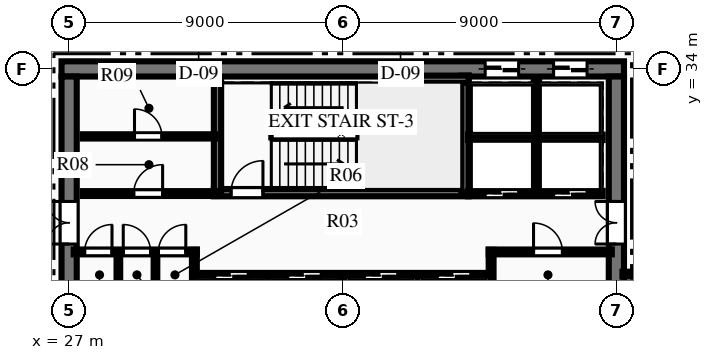
"""IFC4 building model, lengths in metres.
Left out: names, types, materials, properties, quantities, classifications, styles, units other than length and angle.
Written with IfcOpenShell. Run it as: python <this file> out.ifc"""

import sys

from ifc_helpers import new_model, si_unit, direction, frame, frame_2d, origin, place, context, subcontext, project, spatial, rectangle, extrude, element, fill, save


model = new_model("IFC4")
c1 = context("Model", 3, precision=1e-05, world=origin(), true_north=direction((0.0, 1.0)))
c2 = subcontext(c1, "Body", "Model", "MODEL_VIEW")
j1 = project(units=[si_unit("LENGTHUNIT", "METRE"), si_unit("PLANEANGLEUNIT", "RADIAN")], contexts=[c1])
p1 = place(None, origin())
s1 = spatial("IfcSite", under=j1, at=p1, CompositionType="ELEMENT")
p2 = place(p1, origin())
s2 = spatial("IfcBuilding", under=s1, at=p2, CompositionType="ELEMENT")
p3 = place(p2, frame((0.0, 0.0, 140.7)))
s3 = spatial("IfcBuildingStorey", under=s2, at=p3, CompositionType="ELEMENT", Elevation=140.7)
p4 = place(p3, frame((26.75, 34.0, 0.0), z_axis=(0.0, 0.0, 1.0), x_axis=(1.0, 0.0, 0.0)))
e1 = element("IfcWall", 1, at=p4, inside=s3, PredefinedType="SHEAR", context=c2, shape_type="SweptSolid", body=[
    extrude(rectangle(XDim=18.5, YDim=0.5, at=frame_2d((9.25, 0.0))), origin(), (0.0, 0.0, 1.0), 3.75),
])
p5 = place(p4, frame((13.935, 0.0, 0.0)))
e2 = element("IfcOpeningElement", 2, at=p5, cuts=e1, PredefinedType="OPENING", context=c2, shape_type="SweptSolid", body=[
    extrude(rectangle(XDim=1.1, YDim=2.15, at=frame_2d((0.55, 1.075))), frame((0.0, 0.26, 0.0), z_axis=(0.0, -1.0, 0.0), x_axis=(1.0, 0.0, 0.0)), (0.0, 0.0, 1.0), 0.52),
])
p6 = place(p4, frame((16.185, 0.0, 0.0)))
e3 = element("IfcOpeningElement", 3, at=p6, cuts=e1, PredefinedType="OPENING", context=c2, shape_type="SweptSolid", body=[
    extrude(rectangle(XDim=1.1, YDim=2.15, at=frame_2d((0.55, 1.075))), frame((0.0, 0.26, 0.0), z_axis=(0.0, -1.0, 0.0), x_axis=(1.0, 0.0, 0.0)), (0.0, 0.0, 1.0), 0.52),
])
p7 = place(p3, frame((27.0, 18.25, 0.0), z_axis=(0.0, 0.0, 1.0), x_axis=(0.0, 1.0, 0.0)))
e4 = element("IfcWall", 4, at=p7, inside=s3, PredefinedType="SHEAR", context=c2, shape_type="SweptSolid", body=[
    extrude(rectangle(XDim=15.5, YDim=0.5, at=frame_2d((7.75, 0.0))), origin(), (0.0, 0.0, 1.0), 3.75),
])
p8 = place(p7, frame((9.99, 0.0, 0.0)))
e5 = element("IfcOpeningElement", 5, at=p8, cuts=e4, PredefinedType="OPENING", context=c2, shape_type="SweptSolid", body=[
    extrude(rectangle(XDim=1.4, YDim=2.2, at=frame_2d((0.7, 1.1))), frame((0.0, 0.26, 0.0), z_axis=(0.0, -1.0, 0.0), x_axis=(1.0, 0.0, 0.0)), (0.0, 0.0, 1.0), 0.52),
])
p9 = place(p3, frame((45.0, 18.25, 0.0), z_axis=(0.0, 0.0, 1.0), x_axis=(0.0, 1.0, 0.0)))
e6 = element("IfcWall", 6, at=p9, inside=s3, PredefinedType="SHEAR", context=c2, shape_type="SweptSolid", body=[
    extrude(rectangle(XDim=15.5, YDim=0.5, at=frame_2d((7.75, 0.0))), origin(), (0.0, 0.0, 1.0), 3.75),
])
p10 = place(p9, frame((9.99, 0.0, 0.0)))
e7 = element("IfcOpeningElement", 7, at=p10, cuts=e6, PredefinedType="OPENING", context=c2, shape_type="SweptSolid", body=[
    extrude(rectangle(XDim=1.4, YDim=2.2, at=frame_2d((0.7, 1.1))), frame((0.0, 0.26, 0.0), z_axis=(0.0, -1.0, 0.0), x_axis=(1.0, 0.0, 0.0)), (0.0, 0.0, 1.0), 0.52),
])
p11 = place(p3, frame((31.76, 29.93, 0.0), z_axis=(0.0, 0.0, 1.0), x_axis=(1.0, 0.0, 0.0)))
e8 = element("IfcWall", 8, at=p11, inside=s3, PredefinedType="SHEAR", context=c2, shape_type="SweptSolid", body=[
    extrude(rectangle(XDim=8.38, YDim=0.24, at=frame_2d((4.19, 0.0))), origin(), (0.0, 0.0, 1.0), 3.75),
])
p12 = place(p11, frame((0.565, 0.0, 0.0)))
e9 = element("IfcOpeningElement", 9, at=p12, cuts=e8, PredefinedType="OPENING", context=c2, shape_type="SweptSolid", body=[
    extrude(rectangle(XDim=1.05, YDim=2.15, at=frame_2d((0.525, 1.075))), frame((0.0, 0.13, 0.0), z_axis=(0.0, -1.0, 0.0), x_axis=(1.0, 0.0, 0.0)), (0.0, 0.0, 1.0), 0.26),
])
p13 = place(p3, frame((31.88, 29.93, 0.0), z_axis=(0.0, 0.0, 1.0), x_axis=(0.0, 1.0, 0.0)))
e10 = element("IfcWall", 10, at=p13, inside=s3, PredefinedType="SHEAR", context=c2, shape_type="SweptSolid", body=[
    extrude(rectangle(XDim=3.79, YDim=0.24, at=frame_2d((1.895, 0.0))), origin(), (0.0, 0.0, 1.0), 3.75),
])
p14 = place(p3, frame((40.02, 29.93, 0.0), z_axis=(0.0, 0.0, 1.0), x_axis=(0.0, 1.0, 0.0)))
e11 = element("IfcWall", 11, at=p14, inside=s3, PredefinedType="SHEAR", context=c2, shape_type="SweptSolid", body=[
    extrude(rectangle(XDim=3.85, YDim=0.24, at=frame_2d((1.925, 0.0))), origin(), (0.0, 0.0, 1.0), 3.75),
])
p15 = place(p3, frame((37.85, 33.66, 0.0), z_axis=(0.0, 0.0, 1.0), x_axis=(1.0, 0.0, 0.0)))
e12 = element("IfcWall", 12, at=p15, inside=s3, PredefinedType="SHEAR", context=c2, shape_type="SweptSolid", body=[
    extrude(rectangle(XDim=2.29, YDim=0.24, at=frame_2d((1.145, 0.0))), origin(), (0.0, 0.0, 1.0), 3.75),
])
p16 = place(p3, frame((27.15, 27.98, 0.0), z_axis=(0.0, 0.0, 1.0), x_axis=(1.0, 0.0, 0.0)))
e13 = element("IfcWall", 13, at=p16, inside=s3, PredefinedType="PARTITIONING", context=c2, shape_type="SweptSolid", body=[
    extrude(rectangle(XDim=4.05, YDim=0.16, at=frame_2d((2.025, 0.0))), origin(), (0.0, 0.0, 1.0), 3.46),
])
p17 = place(p16, frame((0.36, 0.0, 0.0)))
e14 = element("IfcOpeningElement", 14, at=p17, cuts=e13, PredefinedType="OPENING", context=c2, shape_type="SweptSolid", body=[
    extrude(rectangle(XDim=0.9, YDim=2.15, at=frame_2d((0.45, 1.075))), frame((0.0, 0.09, 0.0), z_axis=(0.0, -1.0, 0.0), x_axis=(1.0, 0.0, 0.0)), (0.0, 0.0, 1.0), 0.18),
])
p18 = place(p16, frame((1.63, 0.0, 0.0)))
e15 = element("IfcOpeningElement", 15, at=p18, cuts=e13, PredefinedType="OPENING", context=c2, shape_type="SweptSolid", body=[
    extrude(rectangle(XDim=0.9, YDim=2.15, at=frame_2d((0.45, 1.075))), frame((0.0, 0.09, 0.0), z_axis=(0.0, -1.0, 0.0), x_axis=(1.0, 0.0, 0.0)), (0.0, 0.0, 1.0), 0.18),
])
p19 = place(p16, frame((2.788, 0.0, 0.0)))
e16 = element("IfcOpeningElement", 16, at=p19, cuts=e13, PredefinedType="OPENING", context=c2, shape_type="SweptSolid", body=[
    extrude(rectangle(XDim=0.9, YDim=2.15, at=frame_2d((0.45, 1.075))), frame((0.0, 0.09, 0.0), z_axis=(0.0, -1.0, 0.0), x_axis=(1.0, 0.0, 0.0)), (0.0, 0.0, 1.0), 0.18),
])
p20 = place(p3, frame((31.12, 26.54, 0.0), z_axis=(0.0, 0.0, 1.0), x_axis=(0.0, 1.0, 0.0)))
e17 = element("IfcWall", 17, at=p20, inside=s3, PredefinedType="PARTITIONING", context=c2, shape_type="SweptSolid", body=[
    extrude(rectangle(XDim=1.51, YDim=0.16, at=frame_2d((0.755, 0.0))), origin(), (0.0, 0.0, 1.0), 3.46),
])
p21 = place(p3, frame((40.8, 27.98, 0.0), z_axis=(0.0, 0.0, 1.0), x_axis=(1.0, 0.0, 0.0)))
e18 = element("IfcWall", 18, at=p21, inside=s3, PredefinedType="PARTITIONING", context=c2, shape_type="SweptSolid", body=[
    extrude(rectangle(XDim=4.05, YDim=0.16, at=frame_2d((2.025, 0.0))), origin(), (0.0, 0.0, 1.0), 3.46),
])
p22 = place(p21, frame((1.475, 0.0, 0.0)))
e19 = element("IfcOpeningElement", 19, at=p22, cuts=e18, PredefinedType="OPENING", context=c2, shape_type="SweptSolid", body=[
    extrude(rectangle(XDim=0.95, YDim=2.15, at=frame_2d((0.475, 1.075))), frame((0.0, 0.09, 0.0), z_axis=(0.0, -1.0, 0.0), x_axis=(1.0, 0.0, 0.0)), (0.0, 0.0, 1.0), 0.18),
])
p23 = place(p3, frame((40.88, 26.54, 0.0), z_axis=(0.0, 0.0, 1.0), x_axis=(0.0, 1.0, 0.0)))
e20 = element("IfcWall", 20, at=p23, inside=s3, PredefinedType="PARTITIONING", context=c2, shape_type="SweptSolid", body=[
    extrude(rectangle(XDim=1.51, YDim=0.16, at=frame_2d((0.755, 0.0))), origin(), (0.0, 0.0, 1.0), 3.46),
])
for number, where, z_axis, x_axis in (
    (21, (28.62, 26.54, 0.0), (0.0, 0.0, 1.0), (0.0, 1.0, 0.0)),
    (22, (29.84, 26.54, 0.0), (0.0, 0.0, 1.0), (0.0, 1.0, 0.0)),
):
    element("IfcWall", number, at=place(p3, frame(where, z_axis=z_axis, x_axis=x_axis)), inside=s3, PredefinedType="PARTITIONING", context=c2, shape_type="SweptSolid", body=[
        extrude(rectangle(XDim=1.44, YDim=0.12, at=frame_2d((0.72, 0.0))), origin(), (0.0, 0.0, 1.0), 3.46),
    ])
p24 = place(p3, frame((27.45, 29.9, 0.0), z_axis=(0.0, 0.0, 1.0), x_axis=(1.0, 0.0, 0.0)))
e23 = element("IfcWall", 23, at=p24, inside=s3, PredefinedType="PARTITIONING", context=c2, shape_type="SweptSolid", body=[
    extrude(rectangle(XDim=4.43, YDim=0.16, at=frame_2d((2.215, 0.0))), origin(), (0.0, 0.0, 1.0), 3.46),
])
p25 = place(p24, frame((1.675, 0.0, 0.0)))
e24 = element("IfcOpeningElement", 24, at=p25, cuts=e23, PredefinedType="OPENING", context=c2, shape_type="SweptSolid", body=[
    extrude(rectangle(XDim=0.95, YDim=2.15, at=frame_2d((0.475, 1.075))), frame((0.0, 0.09, 0.0), z_axis=(0.0, -1.0, 0.0), x_axis=(1.0, 0.0, 0.0)), (0.0, 0.0, 1.0), 0.18),
])
p26 = place(p3, frame((27.45, 31.78, 0.0), z_axis=(0.0, 0.0, 1.0), x_axis=(1.0, 0.0, 0.0)))
e25 = element("IfcWall", 25, at=p26, inside=s3, PredefinedType="PARTITIONING", context=c2, shape_type="SweptSolid", body=[
    extrude(rectangle(XDim=4.35, YDim=0.14, at=frame_2d((2.175, 0.0))), origin(), (0.0, 0.0, 1.0), 3.46),
])
p27 = place(p26, frame((1.7, 0.0, 0.0)))
e26 = element("IfcOpeningElement", 26, at=p27, cuts=e25, PredefinedType="OPENING", context=c2, shape_type="SweptSolid", body=[
    extrude(rectangle(XDim=0.9, YDim=2.15, at=frame_2d((0.45, 1.075))), frame((0.0, 0.08, 0.0), z_axis=(0.0, -1.0, 0.0), x_axis=(1.0, 0.0, 0.0)), (0.0, 0.0, 1.0), 0.16),
])
p28 = place(p3, frame((40.12, 29.9, 0.0), z_axis=(0.0, 0.0, 1.0), x_axis=(1.0, 0.0, 0.0)))
e27 = element("IfcWall", 27, at=p28, inside=s3, PredefinedType="PARTITIONING", context=c2, shape_type="SweptSolid", body=[
    extrude(rectangle(XDim=4.43, YDim=0.18, at=frame_2d((2.215, 0.0))), origin(), (0.0, 0.0, 1.0), 3.46),
])
p29 = place(p28, frame((0.565, 0.0, 0.0)))
e28 = element("IfcOpeningElement", 28, at=p29, cuts=e27, PredefinedType="OPENING", context=c2, shape_type="SweptSolid", body=[
    extrude(rectangle(XDim=1.1, YDim=2.15, at=frame_2d((0.55, 1.075))), frame((0.0, 0.1, 0.0), z_axis=(0.0, -1.0, 0.0), x_axis=(1.0, 0.0, 0.0)), (0.0, 0.0, 1.0), 0.2),
])
p30 = place(p28, frame((2.815, 0.0, 0.0)))
e29 = element("IfcOpeningElement", 29, at=p30, cuts=e27, PredefinedType="OPENING", context=c2, shape_type="SweptSolid", body=[
    extrude(rectangle(XDim=1.1, YDim=2.15, at=frame_2d((0.55, 1.075))), frame((0.0, 0.1, 0.0), z_axis=(0.0, -1.0, 0.0), x_axis=(1.0, 0.0, 0.0)), (0.0, 0.0, 1.0), 0.2),
])
p31 = place(p3, frame((40.12, 31.75, 0.0), z_axis=(0.0, 0.0, 1.0), x_axis=(1.0, 0.0, 0.0)))
e30 = element("IfcWall", 30, at=p31, inside=s3, PredefinedType="PARTITIONING", context=c2, shape_type="SweptSolid", body=[
    extrude(rectangle(XDim=4.43, YDim=0.18, at=frame_2d((2.215, 0.0))), origin(), (0.0, 0.0, 1.0), 3.46),
])
p32 = place(p3, frame((42.37, 29.9, 0.0), z_axis=(0.0, 0.0, 1.0), x_axis=(0.0, 1.0, 0.0)))
e31 = element("IfcWall", 31, at=p32, inside=s3, PredefinedType="PARTITIONING", context=c2, shape_type="SweptSolid", body=[
    extrude(rectangle(XDim=3.75, YDim=0.18, at=frame_2d((1.875, 0.0))), origin(), (0.0, 0.0, 1.0), 3.46),
])
p33 = place(p3, frame((31.2, 27.2, 0.0), z_axis=(0.0, 0.0, 1.0), x_axis=(1.0, 0.0, 0.0)))
e32 = element("IfcWall", 32, at=p33, inside=s3, PredefinedType="PARTITIONING", context=c2, shape_type="SweptSolid", body=[
    extrude(rectangle(XDim=9.6, YDim=0.18, at=frame_2d((4.8, 0.0))), origin(), (0.0, 0.0, 1.0), 3.46),
])
p34 = place(p33, frame((0.59, 0.0, 0.0)))
e33 = element("IfcOpeningElement", 33, at=p34, cuts=e32, PredefinedType="OPENING", context=c2, shape_type="SweptSolid", body=[
    extrude(rectangle(XDim=1.1, YDim=2.15, at=frame_2d((0.55, 1.075))), frame((0.0, 0.1, 0.0), z_axis=(0.0, -1.0, 0.0), x_axis=(1.0, 0.0, 0.0)), (0.0, 0.0, 1.0), 0.2),
])
p35 = place(p33, frame((2.99, 0.0, 0.0)))
e34 = element("IfcOpeningElement", 34, at=p35, cuts=e32, PredefinedType="OPENING", context=c2, shape_type="SweptSolid", body=[
    extrude(rectangle(XDim=1.1, YDim=2.15, at=frame_2d((0.55, 1.075))), frame((0.0, 0.1, 0.0), z_axis=(0.0, -1.0, 0.0), x_axis=(1.0, 0.0, 0.0)), (0.0, 0.0, 1.0), 0.2),
])
p36 = place(p33, frame((5.51, 0.0, 0.0)))
e35 = element("IfcOpeningElement", 35, at=p36, cuts=e32, PredefinedType="OPENING", context=c2, shape_type="SweptSolid", body=[
    extrude(rectangle(XDim=1.1, YDim=2.15, at=frame_2d((0.55, 1.075))), frame((0.0, 0.1, 0.0), z_axis=(0.0, -1.0, 0.0), x_axis=(1.0, 0.0, 0.0)), (0.0, 0.0, 1.0), 0.2),
])
p37 = place(p33, frame((7.91, 0.0, 0.0)))
e36 = element("IfcOpeningElement", 36, at=p37, cuts=e32, PredefinedType="OPENING", context=c2, shape_type="SweptSolid", body=[
    extrude(rectangle(XDim=1.1, YDim=2.15, at=frame_2d((0.55, 1.075))), frame((0.0, 0.1, 0.0), z_axis=(0.0, -1.0, 0.0), x_axis=(1.0, 0.0, 0.0)), (0.0, 0.0, 1.0), 0.2),
])
for number, where, z_axis, x_axis in (
    (37, (33.54, 25.3, 0.0), (0.0, 0.0, 1.0), (0.0, 1.0, 0.0)),
    (38, (36.0, 25.3, 0.0), (0.0, 0.0, 1.0), (0.0, 1.0, 0.0)),
    (39, (38.46, 25.3, 0.0), (0.0, 0.0, 1.0), (0.0, 1.0, 0.0)),
):
    element("IfcWall", number, at=place(p3, frame(where, z_axis=z_axis, x_axis=x_axis)), inside=s3, PredefinedType="PARTITIONING", context=c2, shape_type="SweptSolid", body=[
        extrude(rectangle(XDim=1.9, YDim=0.18, at=frame_2d((0.95, 0.0))), origin(), (0.0, 0.0, 1.0), 3.46),
    ])
p38 = place(p3, frame((45.2, 27.25, 0.0), z_axis=(0.0, 0.0, 1.0), x_axis=(1.0, 0.0, 0.0)))
e40 = element("IfcWall", 40, at=p38, inside=s3, PredefinedType="PARTITIONING", context=c2, shape_type="SweptSolid", body=[
    extrude(rectangle(XDim=2.25, YDim=0.16, at=frame_2d((1.125, 0.0))), origin(), (0.0, 0.0, 1.0), 3.46),
])
p39 = place(p17, origin())
e41 = element("IfcDoor", 41, at=p39, inside=s3, OperationType="SINGLE_SWING_RIGHT", PredefinedType="DOOR", context=c2, shape_type="SweptSolid", body=[
    extrude(rectangle(XDim=0.9, YDim=2.15, at=frame_2d((0.45, 1.075))), frame((0.0, 0.025, 0.0), z_axis=(0.0, -1.0, 0.0), x_axis=(1.0, 0.0, 0.0)), (0.0, 0.0, 1.0), 0.05),
])
fill(e14, e41)
p40 = place(p18, origin())
e42 = element("IfcDoor", 42, at=p40, inside=s3, OperationType="SINGLE_SWING_LEFT", PredefinedType="DOOR", context=c2, shape_type="SweptSolid", body=[
    extrude(rectangle(XDim=0.9, YDim=2.15, at=frame_2d((0.45, 1.075))), frame((0.0, 0.025, 0.0), z_axis=(0.0, -1.0, 0.0), x_axis=(1.0, 0.0, 0.0)), (0.0, 0.0, 1.0), 0.05),
])
fill(e15, e42)
p41 = place(p19, origin())
e43 = element("IfcDoor", 43, at=p41, inside=s3, OperationType="SINGLE_SWING_RIGHT", PredefinedType="DOOR", context=c2, shape_type="SweptSolid", body=[
    extrude(rectangle(XDim=0.9, YDim=2.15, at=frame_2d((0.45, 1.075))), frame((0.0, 0.025, 0.0), z_axis=(0.0, -1.0, 0.0), x_axis=(1.0, 0.0, 0.0)), (0.0, 0.0, 1.0), 0.05),
])
fill(e16, e43)
p42 = place(p22, origin())
e44 = element("IfcDoor", 44, at=p42, inside=s3, OperationType="SINGLE_SWING_LEFT", PredefinedType="DOOR", context=c2, shape_type="SweptSolid", body=[
    extrude(rectangle(XDim=0.95, YDim=2.15, at=frame_2d((0.475, 1.075))), frame((0.0, 0.025, 0.0), z_axis=(0.0, -1.0, 0.0), x_axis=(1.0, 0.0, 0.0)), (0.0, 0.0, 1.0), 0.05),
])
fill(e19, e44)
p43 = place(p25, origin())
e45 = element("IfcDoor", 45, at=p43, inside=s3, OperationType="SINGLE_SWING_RIGHT", PredefinedType="DOOR", context=c2, shape_type="SweptSolid", body=[
    extrude(rectangle(XDim=0.95, YDim=2.15, at=frame_2d((0.475, 1.075))), frame((0.0, 0.025, 0.0), z_axis=(0.0, -1.0, 0.0), x_axis=(1.0, 0.0, 0.0)), (0.0, 0.0, 1.0), 0.05),
])
fill(e24, e45)
p44 = place(p27, origin())
e46 = element("IfcDoor", 46, at=p44, inside=s3, OperationType="SINGLE_SWING_LEFT", PredefinedType="DOOR", context=c2, shape_type="SweptSolid", body=[
    extrude(rectangle(XDim=0.9, YDim=2.15, at=frame_2d((0.45, 1.075))), frame((0.0, 0.025, 0.0), z_axis=(0.0, -1.0, 0.0), x_axis=(1.0, 0.0, 0.0)), (0.0, 0.0, 1.0), 0.05),
])
fill(e26, e46)
p45 = place(p12, origin())
e47 = element("IfcDoor", 47, at=p45, inside=s3, OperationType="SINGLE_SWING_RIGHT", PredefinedType="DOOR", context=c2, shape_type="SweptSolid", body=[
    extrude(rectangle(XDim=1.05, YDim=2.15, at=frame_2d((0.525, 1.075))), frame((0.0, 0.025, 0.0), z_axis=(0.0, -1.0, 0.0), x_axis=(1.0, 0.0, 0.0)), (0.0, 0.0, 1.0), 0.05),
])
fill(e9, e47)
p46 = place(p8, origin())
e48 = element("IfcDoor", 48, at=p46, inside=s3, OperationType="DOUBLE_DOOR_SINGLE_SWING", PredefinedType="DOOR", context=c2, shape_type="SweptSolid", body=[
    extrude(rectangle(XDim=1.4, YDim=2.2, at=frame_2d((0.7, 1.1))), frame((0.0, 0.025, 0.0), z_axis=(0.0, -1.0, 0.0), x_axis=(1.0, 0.0, 0.0)), (0.0, 0.0, 1.0), 0.05),
])
fill(e5, e48)
p47 = place(p10, origin())
e49 = element("IfcDoor", 49, at=p47, inside=s3, OperationType="DOUBLE_DOOR_SINGLE_SWING", PredefinedType="DOOR", context=c2, shape_type="SweptSolid", body=[
    extrude(rectangle(XDim=1.4, YDim=2.2, at=frame_2d((0.7, 1.1))), frame((0.0, 0.025, 0.0), z_axis=(0.0, -1.0, 0.0), x_axis=(1.0, 0.0, 0.0)), (0.0, 0.0, 1.0), 0.05),
])
fill(e7, e49)
p48 = place(p29, origin())
e50 = element("IfcDoor", 50, at=p48, inside=s3, OperationType="SLIDING_TO_LEFT", PredefinedType="DOOR", context=c2, shape_type="SweptSolid", body=[
    extrude(rectangle(XDim=1.1, YDim=2.15, at=frame_2d((0.55, 1.075))), frame((0.0, 0.025, 0.0), z_axis=(0.0, -1.0, 0.0), x_axis=(1.0, 0.0, 0.0)), (0.0, 0.0, 1.0), 0.05),
])
fill(e28, e50)
p49 = place(p30, origin())
e51 = element("IfcDoor", 51, at=p49, inside=s3, OperationType="SLIDING_TO_LEFT", PredefinedType="DOOR", context=c2, shape_type="SweptSolid", body=[
    extrude(rectangle(XDim=1.1, YDim=2.15, at=frame_2d((0.55, 1.075))), frame((0.0, 0.025, 0.0), z_axis=(0.0, -1.0, 0.0), x_axis=(1.0, 0.0, 0.0)), (0.0, 0.0, 1.0), 0.05),
])
fill(e29, e51)
p50 = place(p5, origin())
e52 = element("IfcDoor", 52, at=p50, inside=s3, OperationType="SLIDING_TO_LEFT", PredefinedType="DOOR", context=c2, shape_type="SweptSolid", body=[
    extrude(rectangle(XDim=1.1, YDim=2.15, at=frame_2d((0.55, 1.075))), frame((0.0, 0.025, 0.0), z_axis=(0.0, -1.0, 0.0), x_axis=(1.0, 0.0, 0.0)), (0.0, 0.0, 1.0), 0.05),
])
fill(e2, e52)
p51 = place(p6, origin())
e53 = element("IfcDoor", 53, at=p51, inside=s3, OperationType="SLIDING_TO_LEFT", PredefinedType="DOOR", context=c2, shape_type="SweptSolid", body=[
    extrude(rectangle(XDim=1.1, YDim=2.15, at=frame_2d((0.55, 1.075))), frame((0.0, 0.025, 0.0), z_axis=(0.0, -1.0, 0.0), x_axis=(1.0, 0.0, 0.0)), (0.0, 0.0, 1.0), 0.05),
])
fill(e3, e53)
p52 = place(p34, origin())
e54 = element("IfcDoor", 54, at=p52, inside=s3, OperationType="SLIDING_TO_LEFT", PredefinedType="DOOR", context=c2, shape_type="SweptSolid", body=[
    extrude(rectangle(XDim=1.1, YDim=2.15, at=frame_2d((0.55, 1.075))), frame((0.0, 0.025, 0.0), z_axis=(0.0, -1.0, 0.0), x_axis=(1.0, 0.0, 0.0)), (0.0, 0.0, 1.0), 0.05),
])
fill(e33, e54)
p53 = place(p35, origin())
e55 = element("IfcDoor", 55, at=p53, inside=s3, OperationType="SLIDING_TO_LEFT", PredefinedType="DOOR", context=c2, shape_type="SweptSolid", body=[
    extrude(rectangle(XDim=1.1, YDim=2.15, at=frame_2d((0.55, 1.075))), frame((0.0, 0.025, 0.0), z_axis=(0.0, -1.0, 0.0), x_axis=(1.0, 0.0, 0.0)), (0.0, 0.0, 1.0), 0.05),
])
fill(e34, e55)
p54 = place(p36, origin())
e56 = element("IfcDoor", 56, at=p54, inside=s3, OperationType="SLIDING_TO_LEFT", PredefinedType="DOOR", context=c2, shape_type="SweptSolid", body=[
    extrude(rectangle(XDim=1.1, YDim=2.15, at=frame_2d((0.55, 1.075))), frame((0.0, 0.025, 0.0), z_axis=(0.0, -1.0, 0.0), x_axis=(1.0, 0.0, 0.0)), (0.0, 0.0, 1.0), 0.05),
])
fill(e35, e56)
p55 = place(p37, origin())
e57 = element("IfcDoor", 57, at=p55, inside=s3, OperationType="SLIDING_TO_LEFT", PredefinedType="DOOR", context=c2, shape_type="SweptSolid", body=[
    extrude(rectangle(XDim=1.1, YDim=2.15, at=frame_2d((0.55, 1.075))), frame((0.0, 0.025, 0.0), z_axis=(0.0, -1.0, 0.0), x_axis=(1.0, 0.0, 0.0)), (0.0, 0.0, 1.0), 0.05),
])
fill(e36, e57)
save(model, sys.argv[1])
